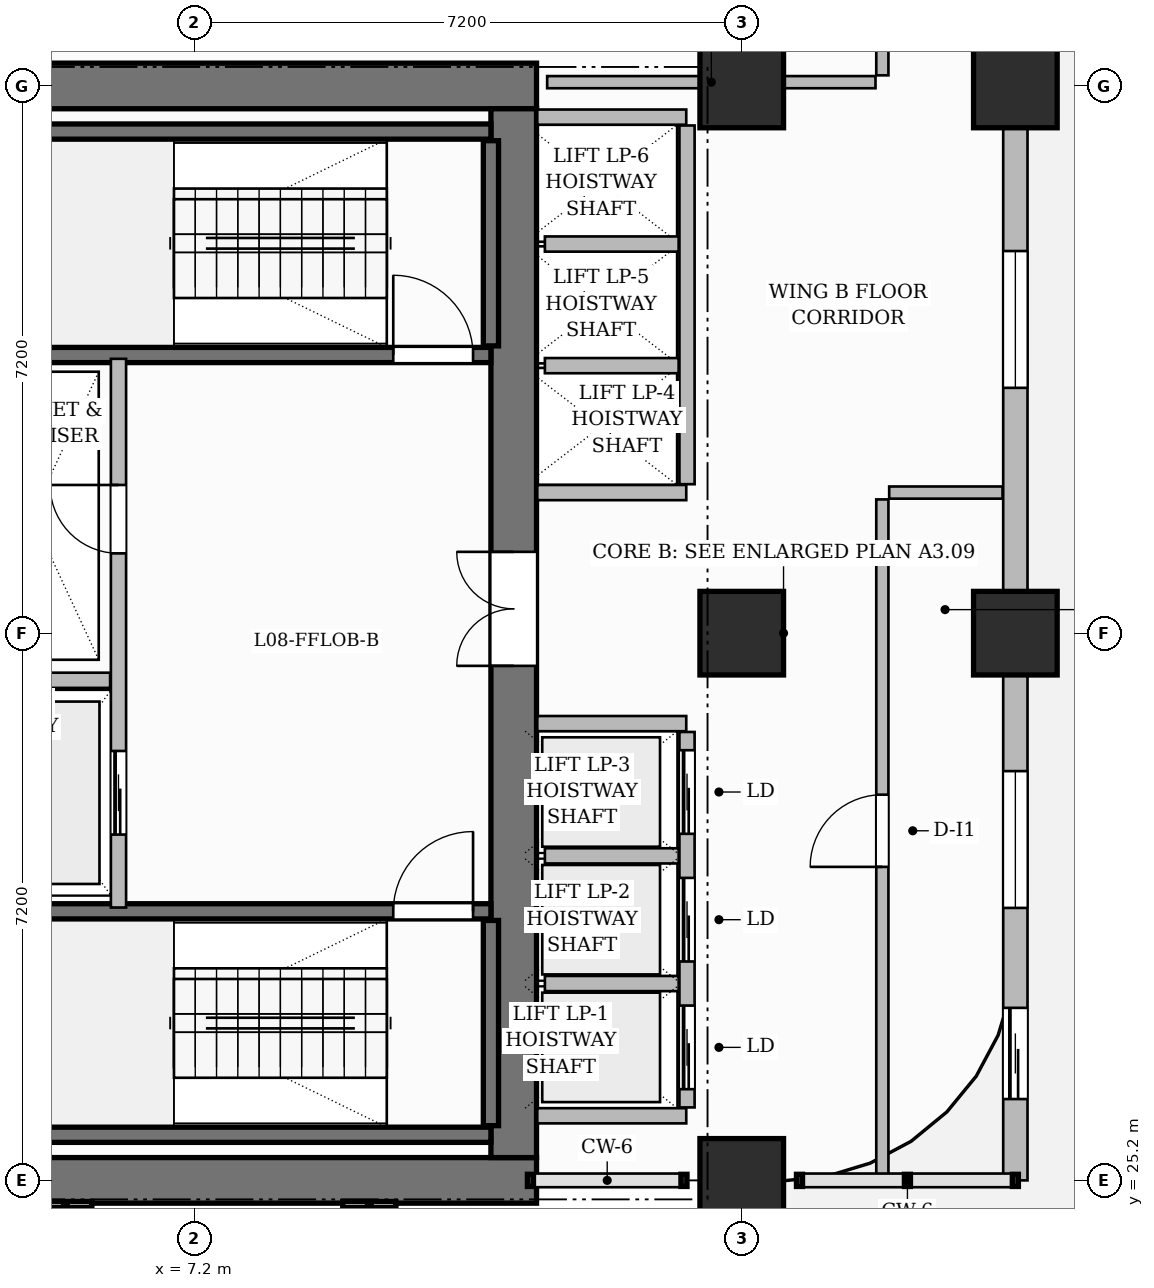
"""IFC4 building model, lengths in metres.
Left out: names, types, materials, properties, quantities, classifications, styles, units other than length and angle.
Written with IfcOpenShell. Run it as: python <this file> out.ifc"""

import sys

from ifc_helpers import new_model, si_unit, direction, frame, frame_2d, origin, origin_2d, place, context, subcontext, project, spatial, rectangle, extrude, source, transform, mapped, element, fill, save


model = new_model("IFC4")
c1 = context("Model", 3, precision=1e-05, world=origin(), true_north=direction((0.0, 1.0)))
c2 = subcontext(c1, "Body", "Model", "MODEL_VIEW")
j1 = project(units=[si_unit("LENGTHUNIT", "METRE"), si_unit("PLANEANGLEUNIT", "RADIAN")], contexts=[c1])
p1 = place(None, origin())
s1 = spatial("IfcSite", under=j1, at=p1, CompositionType="ELEMENT")
p2 = place(p1, origin())
s2 = spatial("IfcBuilding", under=s1, at=p2, CompositionType="ELEMENT")
p3 = place(p2, frame((0.0, 0.0, 39.8)))
s3 = spatial("IfcBuildingStorey", under=s2, at=p3, CompositionType="ELEMENT", Elevation=39.8)
for number, where, z_axis, x_axis in (
    (1, (3.3, 25.2, 0.0), (0.0, 0.0, 1.0), (1.0, 0.0, 0.0)),
    (2, (3.3, 39.6, 0.0), (0.0, 0.0, 1.0), (1.0, 0.0, 0.0)),
):
    element("IfcWall", number, at=place(p3, frame(where, z_axis=z_axis, x_axis=x_axis)), inside=s3, PredefinedType="SHEAR", context=c2, shape_type="SweptSolid", body=[
        extrude(rectangle(XDim=8.4, YDim=0.6, at=frame_2d((4.2, 0.0))), origin(), (0.0, 0.0, 1.0), 3.7),
    ])
p4 = place(p3, frame((11.4, 25.5, 0.0), z_axis=(0.0, 0.0, 1.0), x_axis=(0.0, 1.0, 0.0)))
e3 = element("IfcWall", 3, at=p4, inside=s3, PredefinedType="SHEAR", context=c2, shape_type="SweptSolid", body=[
    extrude(rectangle(XDim=13.8, YDim=0.6, at=frame_2d((6.9, 0.0))), origin(), (0.0, 0.0, 1.0), 3.7),
])
p5 = place(p4, frame((6.47, 0.0, 0.0)))
e4 = element("IfcOpeningElement", 4, at=p5, cuts=e3, PredefinedType="OPENING", context=c2, shape_type="SweptSolid", body=[
    extrude(rectangle(XDim=1.5, YDim=2.2, at=frame_2d((0.75, 1.1))), frame((0.0, 0.31, 0.0), z_axis=(0.0, -1.0, 0.0), x_axis=(1.0, 0.0, 0.0)), (0.0, 0.0, 1.0), 0.62),
])
m1 = source(origin(), c2, "Body", "SweptSolid", [
    extrude(rectangle(XDim=1.1, YDim=1.1, at=origin_2d()), origin(), (0.0, 0.0, 1.0), 3.7),
])
for number, where, z_axis, x_axis in (
    (5, (14.4, 25.2, 0.0), (0.0, 0.0, 1.0), (1.0, 0.0, 0.0)),
    (6, (14.4, 32.4, 0.0), (0.0, 0.0, 1.0), (1.0, 0.0, 0.0)),
    (7, (14.4, 39.6, 0.0), (0.0, 0.0, 1.0), (1.0, 0.0, 0.0)),
    (8, (18.0, 32.4, 0.0), (0.0, 0.0, 1.0), (1.0, 0.0, 0.0)),
    (9, (18.0, 39.6, 0.0), (0.0, 0.0, 1.0), (1.0, 0.0, 0.0)),
):
    element("IfcColumn", number, at=place(p3, frame(where, z_axis=z_axis, x_axis=x_axis)), inside=s3, PredefinedType="COLUMN", context=c2, shape_type="MappedRepresentation", body=[
        mapped(m1, transform((0.0, 0.0, 0.0), scale=1.0)),
    ])
p6 = place(p3, frame((4.0, 25.8, 0.0), z_axis=(0.0, 0.0, 1.0), x_axis=(1.0, 0.0, 0.0)))
e10 = element("IfcWall", 10, at=p6, inside=s3, PredefinedType="SHEAR", context=c2, shape_type="SweptSolid", body=[
    extrude(rectangle(XDim=7.1, YDim=0.2, at=frame_2d((3.55, 0.0))), origin(), (0.0, 0.0, 1.0), 3.7),
])
p7 = place(p3, frame((11.1, 25.92, 0.0), z_axis=(0.0, 0.0, 1.0), x_axis=(0.0, 1.0, 0.0)))
e11 = element("IfcWall", 11, at=p7, inside=s3, PredefinedType="SHEAR", context=c2, shape_type="SweptSolid", body=[
    extrude(rectangle(XDim=2.7, YDim=0.2, at=frame_2d((1.35, 0.0))), origin(), (0.0, 0.0, 1.0), 3.7),
])
p8 = place(p3, frame((4.0, 28.74, 0.0), z_axis=(0.0, 0.0, 1.0), x_axis=(1.0, 0.0, 0.0)))
e12 = element("IfcWall", 12, at=p8, inside=s3, PredefinedType="SHEAR", context=c2, shape_type="SweptSolid", body=[
    extrude(rectangle(XDim=7.1, YDim=0.2, at=frame_2d((3.55, 0.0))), origin(), (0.0, 0.0, 1.0), 3.7),
])
p9 = place(p8, frame((5.815, 0.0, 0.0)))
e13 = element("IfcOpeningElement", 13, at=p9, cuts=e12, PredefinedType="OPENING", context=c2, shape_type="SweptSolid", body=[
    extrude(rectangle(XDim=1.05, YDim=2.2, at=frame_2d((0.525, 1.1))), frame((0.0, 0.11, 0.0), z_axis=(0.0, -1.0, 0.0), x_axis=(1.0, 0.0, 0.0)), (0.0, 0.0, 1.0), 0.22),
])
p10 = place(p3, frame((4.0, 39.0, 0.0), z_axis=(0.0, 0.0, 1.0), x_axis=(1.0, 0.0, 0.0)))
e14 = element("IfcWall", 14, at=p10, inside=s3, PredefinedType="SHEAR", context=c2, shape_type="SweptSolid", body=[
    extrude(rectangle(XDim=7.1, YDim=0.2, at=frame_2d((3.55, 0.0))), origin(), (0.0, 0.0, 1.0), 3.7),
])
p11 = place(p3, frame((11.1, 36.18, 0.0), z_axis=(0.0, 0.0, 1.0), x_axis=(0.0, 1.0, 0.0)))
e15 = element("IfcWall", 15, at=p11, inside=s3, PredefinedType="SHEAR", context=c2, shape_type="SweptSolid", body=[
    extrude(rectangle(XDim=2.7, YDim=0.2, at=frame_2d((1.35, 0.0))), origin(), (0.0, 0.0, 1.0), 3.7),
])
p12 = place(p3, frame((4.0, 36.06, 0.0), z_axis=(0.0, 0.0, 1.0), x_axis=(1.0, 0.0, 0.0)))
e16 = element("IfcWall", 16, at=p12, inside=s3, PredefinedType="SHEAR", context=c2, shape_type="SweptSolid", body=[
    extrude(rectangle(XDim=7.1, YDim=0.2, at=frame_2d((3.55, 0.0))), origin(), (0.0, 0.0, 1.0), 3.7),
])
p13 = place(p12, frame((5.815, 0.0, 0.0)))
e17 = element("IfcOpeningElement", 17, at=p13, cuts=e16, PredefinedType="OPENING", context=c2, shape_type="SweptSolid", body=[
    extrude(rectangle(XDim=1.05, YDim=2.2, at=frame_2d((0.525, 1.1))), frame((0.0, 0.11, 0.0), z_axis=(0.0, -1.0, 0.0), x_axis=(1.0, 0.0, 0.0)), (0.0, 0.0, 1.0), 0.22),
])
p14 = place(p3, frame((6.2, 28.79, 0.0), z_axis=(0.0, 0.0, 1.0), x_axis=(0.0, 1.0, 0.0)))
e18 = element("IfcWall", 18, at=p14, inside=s3, PredefinedType="PARTITIONING", context=c2, shape_type="SweptSolid", body=[
    extrude(rectangle(XDim=7.22, YDim=0.2, at=frame_2d((3.61, 0.0))), origin(), (0.0, 0.0, 1.0), 3.45),
])
p15 = place(p14, frame((4.66, 0.0, 0.0)))
e19 = element("IfcOpeningElement", 19, at=p15, cuts=e18, PredefinedType="OPENING", context=c2, shape_type="SweptSolid", body=[
    extrude(rectangle(XDim=0.9, YDim=2.1, at=frame_2d((0.45, 1.05))), frame((0.0, 0.11, 0.0), z_axis=(0.0, -1.0, 0.0), x_axis=(1.0, 0.0, 0.0)), (0.0, 0.0, 1.0), 0.22),
])
p16 = place(p14, frame((0.96, 0.0, 0.0)))
e20 = element("IfcOpeningElement", 20, at=p16, cuts=e18, PredefinedType="OPENING", context=c2, shape_type="SweptSolid", body=[
    extrude(rectangle(XDim=1.1, YDim=2.2, at=frame_2d((0.55, 1.1))), frame((0.0, 0.11, 0.0), z_axis=(0.0, -1.0, 0.0), x_axis=(1.0, 0.0, 0.0)), (0.0, 0.0, 1.0), 0.22),
])
p17 = place(p3, frame((3.96, 31.78, 0.0), z_axis=(0.0, 0.0, 1.0), x_axis=(1.0, 0.0, 0.0)))
e21 = element("IfcWall", 21, at=p17, inside=s3, PredefinedType="PARTITIONING", context=c2, shape_type="SweptSolid", body=[
    extrude(rectangle(XDim=2.13, YDim=0.2, at=frame_2d((1.065, 0.0))), origin(), (0.0, 0.0, 1.0), 3.45),
])
for number, where, z_axis, x_axis in (
    (22, (11.71, 26.05, 0.0), (0.0, 0.0, 1.0), (1.0, 0.0, 0.0)),
    (23, (11.71, 31.21, 0.0), (0.0, 0.0, 1.0), (1.0, 0.0, 0.0)),
):
    element("IfcWall", number, at=place(p3, frame(where, z_axis=z_axis, x_axis=x_axis)), inside=s3, PredefinedType="PARTITIONING", context=c2, shape_type="SweptSolid", body=[
        extrude(rectangle(XDim=1.96, YDim=0.2, at=frame_2d((0.98, 0.0))), origin(), (0.0, 0.0, 1.0), 3.45),
    ])
p18 = place(p3, frame((13.68, 26.16, 0.0), z_axis=(0.0, 0.0, 1.0), x_axis=(0.0, 1.0, 0.0)))
e24 = element("IfcWall", 24, at=p18, inside=s3, PredefinedType="PARTITIONING", context=c2, shape_type="SweptSolid", body=[
    extrude(rectangle(XDim=4.94, YDim=0.2, at=frame_2d((2.47, 0.0))), origin(), (0.0, 0.0, 1.0), 3.45),
])
p19 = place(p18, frame((0.24, 0.0, 0.0)))
e25 = element("IfcOpeningElement", 25, at=p19, cuts=e24, PredefinedType="OPENING", context=c2, shape_type="SweptSolid", body=[
    extrude(rectangle(XDim=1.1, YDim=2.2, at=frame_2d((0.55, 1.1))), frame((0.0, 0.11, 0.0), z_axis=(0.0, -1.0, 0.0), x_axis=(1.0, 0.0, 0.0)), (0.0, 0.0, 1.0), 0.22),
])
p20 = place(p18, frame((1.92, 0.0, 0.0)))
e26 = element("IfcOpeningElement", 26, at=p20, cuts=e24, PredefinedType="OPENING", context=c2, shape_type="SweptSolid", body=[
    extrude(rectangle(XDim=1.1, YDim=2.2, at=frame_2d((0.55, 1.1))), frame((0.0, 0.11, 0.0), z_axis=(0.0, -1.0, 0.0), x_axis=(1.0, 0.0, 0.0)), (0.0, 0.0, 1.0), 0.22),
])
p21 = place(p18, frame((3.6, 0.0, 0.0)))
e27 = element("IfcOpeningElement", 27, at=p21, cuts=e24, PredefinedType="OPENING", context=c2, shape_type="SweptSolid", body=[
    extrude(rectangle(XDim=1.1, YDim=2.2, at=frame_2d((0.55, 1.1))), frame((0.0, 0.11, 0.0), z_axis=(0.0, -1.0, 0.0), x_axis=(1.0, 0.0, 0.0)), (0.0, 0.0, 1.0), 0.22),
])
for number, where, z_axis, x_axis in (
    (28, (11.81, 27.79, 0.0), (0.0, 0.0, 1.0), (1.0, 0.0, 0.0)),
    (29, (11.81, 29.47, 0.0), (0.0, 0.0, 1.0), (1.0, 0.0, 0.0)),
):
    element("IfcWall", number, at=place(p3, frame(where, z_axis=z_axis, x_axis=x_axis)), inside=s3, PredefinedType="PARTITIONING", context=c2, shape_type="SweptSolid", body=[
        extrude(rectangle(XDim=1.76, YDim=0.2, at=frame_2d((0.88, 0.0))), origin(), (0.0, 0.0, 1.0), 3.45),
    ])
for number, where, z_axis, x_axis in (
    (30, (11.71, 34.25, 0.0), (0.0, 0.0, 1.0), (1.0, 0.0, 0.0)),
    (31, (11.71, 39.19, 0.0), (0.0, 0.0, 1.0), (1.0, 0.0, 0.0)),
):
    element("IfcWall", number, at=place(p3, frame(where, z_axis=z_axis, x_axis=x_axis)), inside=s3, PredefinedType="PARTITIONING", context=c2, shape_type="SweptSolid", body=[
        extrude(rectangle(XDim=1.96, YDim=0.2, at=frame_2d((0.98, 0.0))), origin(), (0.0, 0.0, 1.0), 3.45),
    ])
p22 = place(p3, frame((13.68, 34.36, 0.0), z_axis=(0.0, 0.0, 1.0), x_axis=(0.0, 1.0, 0.0)))
e32 = element("IfcWall", 32, at=p22, inside=s3, PredefinedType="PARTITIONING", context=c2, shape_type="SweptSolid", body=[
    extrude(rectangle(XDim=4.72, YDim=0.2, at=frame_2d((2.36, 0.0))), origin(), (0.0, 0.0, 1.0), 3.45),
])
for number, where, z_axis, x_axis in (
    (33, (11.81, 35.92, 0.0), (0.0, 0.0, 1.0), (1.0, 0.0, 0.0)),
    (34, (11.81, 37.52, 0.0), (0.0, 0.0, 1.0), (1.0, 0.0, 0.0)),
):
    element("IfcWall", number, at=place(p3, frame(where, z_axis=z_axis, x_axis=x_axis)), inside=s3, PredefinedType="PARTITIONING", context=c2, shape_type="SweptSolid", body=[
        extrude(rectangle(XDim=1.76, YDim=0.2, at=frame_2d((0.88, 0.0))), origin(), (0.0, 0.0, 1.0), 3.45),
    ])
p23 = place(p3, frame((16.25, 25.228, 0.0), z_axis=(0.0, 0.0, 1.0), x_axis=(0.0, 1.0, 0.0)))
e35 = element("IfcWall", 35, at=p23, inside=s3, PredefinedType="PARTITIONING", context=c2, shape_type="SweptSolid", body=[
    extrude(rectangle(XDim=8.932, YDim=0.16, at=frame_2d((4.466, 0.0))), origin(), (0.0, 0.0, 1.0), 3.45),
])
p24 = place(p23, frame((4.097, 0.0, 0.0)))
e36 = element("IfcOpeningElement", 36, at=p24, cuts=e35, PredefinedType="OPENING", context=c2, shape_type="SweptSolid", body=[
    extrude(rectangle(XDim=0.95, YDim=2.15, at=frame_2d((0.475, 1.075))), frame((0.0, 0.09, 0.0), z_axis=(0.0, -1.0, 0.0), x_axis=(1.0, 0.0, 0.0)), (0.0, 0.0, 1.0), 0.18),
])
p25 = place(p3, frame((16.34, 34.25, 0.0), z_axis=(0.0, 0.0, 1.0), x_axis=(1.0, 0.0, 0.0)))
e37 = element("IfcWall", 37, at=p25, inside=s3, PredefinedType="PARTITIONING", context=c2, shape_type="SweptSolid", body=[
    extrude(rectangle(XDim=1.492, YDim=0.16, at=frame_2d((0.746, 0.0))), origin(), (0.0, 0.0, 1.0), 3.45),
])
p26 = place(p3, frame((16.25, 39.74, 0.0), z_axis=(0.0, 0.0, 1.0), x_axis=(0.0, 1.0, 0.0)))
e38 = element("IfcWall", 38, at=p26, inside=s3, PredefinedType="PARTITIONING", context=c2, shape_type="SweptSolid", body=[
    extrude(rectangle(XDim=6.892, YDim=0.16, at=frame_2d((3.446, 0.0))), origin(), (0.0, 0.0, 1.0), 3.45),
])
p27 = place(p26, frame((0.585, 0.0, 0.0)))
e39 = element("IfcOpeningElement", 39, at=p27, cuts=e38, PredefinedType="OPENING", context=c2, shape_type="SweptSolid", body=[
    extrude(rectangle(XDim=1.4, YDim=2.35, at=frame_2d((0.7, 1.175))), frame((0.0, 0.09, 0.0), z_axis=(0.0, -1.0, 0.0), x_axis=(1.0, 0.0, 0.0)), (0.0, 0.0, 1.0), 0.18),
])
p28 = place(p26, frame((4.285, 0.0, 0.0)))
e40 = element("IfcOpeningElement", 40, at=p28, cuts=e38, PredefinedType="OPENING", context=c2, shape_type="SweptSolid", body=[
    extrude(rectangle(XDim=1.0, YDim=2.2, at=frame_2d((0.5, 1.1))), frame((0.0, 0.09, 0.0), z_axis=(0.0, -1.0, 0.0), x_axis=(1.0, 0.0, 0.0)), (0.0, 0.0, 1.0), 0.18),
])
p29 = place(p3, frame((11.84, 39.65, 0.0), z_axis=(0.0, 0.0, 1.0), x_axis=(1.0, 0.0, 0.0)))
e41 = element("IfcWall", 41, at=p29, inside=s3, PredefinedType="PARTITIONING", context=c2, shape_type="SweptSolid", body=[
    extrude(rectangle(XDim=4.32, YDim=0.16, at=frame_2d((2.16, 0.0))), origin(), (0.0, 0.0, 1.0), 2.885),
])
p30 = place(p3, frame((18.0, 25.2, 0.0), z_axis=(0.0, 0.0, 1.0), x_axis=(0.0, 1.0, 0.0)))
e42 = element("IfcWall", 42, at=p30, inside=s3, PredefinedType="SOLIDWALL", context=c2, shape_type="SweptSolid", body=[
    extrude(rectangle(XDim=21.55, YDim=0.32, at=frame_2d((10.775, 0.0))), origin(), (0.0, 0.0, 1.0), 3.45),
])
p31 = place(p30, frame((18.5, 0.0, 0.0)))
e43 = element("IfcOpeningElement", 43, at=p31, cuts=e42, PredefinedType="OPENING", context=c2, shape_type="SweptSolid", body=[
    extrude(rectangle(XDim=1.2, YDim=2.2, at=frame_2d((0.6, 1.1))), frame((0.0, 0.17, 0.0), z_axis=(0.0, -1.0, 0.0), x_axis=(1.0, 0.0, 0.0)), (0.0, 0.0, 1.0), 0.34),
])
p32 = place(p30, frame((1.07, 0.0, 0.0)))
e44 = element("IfcOpeningElement", 44, at=p32, cuts=e42, PredefinedType="OPENING", context=c2, shape_type="SweptSolid", body=[
    extrude(rectangle(XDim=1.2, YDim=2.2, at=frame_2d((0.6, 1.1))), frame((0.0, 0.17, 0.0), z_axis=(0.0, -1.0, 0.0), x_axis=(1.0, 0.0, 0.0)), (0.0, 0.0, 1.0), 0.34),
])
p33 = place(p30, frame((3.585, 0.0, 0.8)))
e45 = element("IfcOpeningElement", 45, at=p33, cuts=e42, PredefinedType="OPENING", context=c2, shape_type="SweptSolid", body=[
    extrude(rectangle(XDim=1.8, YDim=1.85, at=frame_2d((0.9, 0.925))), frame((0.0, 0.17, 0.0), z_axis=(0.0, -1.0, 0.0), x_axis=(1.0, 0.0, 0.0)), (0.0, 0.0, 1.0), 0.34),
])
p34 = place(p30, frame((10.428, 0.0, 0.8)))
e46 = element("IfcOpeningElement", 46, at=p34, cuts=e42, PredefinedType="OPENING", context=c2, shape_type="SweptSolid", body=[
    extrude(rectangle(XDim=1.8, YDim=1.85, at=frame_2d((0.9, 0.925))), frame((0.0, 0.17, 0.0), z_axis=(0.0, -1.0, 0.0), x_axis=(1.0, 0.0, 0.0)), (0.0, 0.0, 1.0), 0.34),
])
p35 = place(p30, frame((15.8, 0.0, 0.8)))
e47 = element("IfcOpeningElement", 47, at=p35, cuts=e42, PredefinedType="OPENING", context=c2, shape_type="SweptSolid", body=[
    extrude(rectangle(XDim=1.8, YDim=1.85, at=frame_2d((0.9, 0.925))), frame((0.0, 0.17, 0.0), z_axis=(0.0, -1.0, 0.0), x_axis=(1.0, 0.0, 0.0)), (0.0, 0.0, 1.0), 0.34),
])
m2 = source(origin(), c2, "Body", "SweptSolid", [
    extrude(rectangle(XDim=1.05, YDim=2.2, at=frame_2d((0.525, 1.1))), frame((0.0, 0.025, 0.0), z_axis=(0.0, -1.0, 0.0), x_axis=(1.0, 0.0, 0.0)), (0.0, 0.0, 1.0), 0.05),
])
p36 = place(p9, origin())
e48 = element("IfcDoor", 48, at=p36, inside=s3, OperationType="SINGLE_SWING_RIGHT", PredefinedType="DOOR", context=c2, shape_type="MappedRepresentation", body=[
    mapped(m2, transform((0.0, 0.0, 0.0), scale=1.0)),
])
fill(e13, e48)
p37 = place(p13, origin())
e49 = element("IfcDoor", 49, at=p37, inside=s3, OperationType="SINGLE_SWING_LEFT", PredefinedType="DOOR", context=c2, shape_type="MappedRepresentation", body=[
    mapped(m2, transform((0.0, 0.0, 0.0), scale=1.0)),
])
fill(e17, e49)
m3 = source(origin(), c2, "Body", "SweptSolid", [
    extrude(rectangle(XDim=0.9, YDim=2.1, at=frame_2d((0.45, 1.05))), frame((0.0, 0.025, 0.0), z_axis=(0.0, -1.0, 0.0), x_axis=(1.0, 0.0, 0.0)), (0.0, 0.0, 1.0), 0.05),
])
p38 = place(p15, origin())
e50 = element("IfcDoor", 50, at=p38, inside=s3, OperationType="SINGLE_SWING_RIGHT", PredefinedType="DOOR", context=c2, shape_type="MappedRepresentation", body=[
    mapped(m3, transform((0.0, 0.0, 0.0), scale=1.0)),
])
fill(e19, e50)
m4 = source(origin(), c2, "Body", "SweptSolid", [
    extrude(rectangle(XDim=1.5, YDim=2.2, at=frame_2d((0.75, 1.1))), frame((0.0, 0.025, 0.0), z_axis=(0.0, -1.0, 0.0), x_axis=(1.0, 0.0, 0.0)), (0.0, 0.0, 1.0), 0.05),
])
p39 = place(p5, origin())
e51 = element("IfcDoor", 51, at=p39, inside=s3, OperationType="DOUBLE_DOOR_SINGLE_SWING", PredefinedType="DOOR", context=c2, shape_type="MappedRepresentation", body=[
    mapped(m4, transform((0.0, 0.0, 0.0), scale=1.0)),
])
fill(e4, e51)
m5 = source(origin(), c2, "Body", "SweptSolid", [
    extrude(rectangle(XDim=0.95, YDim=2.15, at=frame_2d((0.475, 1.075))), frame((0.0, 0.025, 0.0), z_axis=(0.0, -1.0, 0.0), x_axis=(1.0, 0.0, 0.0)), (0.0, 0.0, 1.0), 0.05),
])
p40 = place(p24, origin())
e52 = element("IfcDoor", 52, at=p40, inside=s3, OperationType="SINGLE_SWING_LEFT", PredefinedType="DOOR", context=c2, shape_type="MappedRepresentation", body=[
    mapped(m5, transform((0.0, 0.0, 0.0), scale=1.0)),
])
fill(e36, e52)
m6 = source(origin(), c2, "Body", "SweptSolid", [
    extrude(rectangle(XDim=1.1, YDim=2.2, at=frame_2d((0.55, 1.1))), frame((0.0, 0.025, 0.0), z_axis=(0.0, -1.0, 0.0), x_axis=(1.0, 0.0, 0.0)), (0.0, 0.0, 1.0), 0.05),
])
p41 = place(p16, origin())
e53 = element("IfcDoor", 53, at=p41, inside=s3, OperationType="SLIDING_TO_LEFT", PredefinedType="DOOR", context=c2, shape_type="MappedRepresentation", body=[
    mapped(m6, transform((0.0, 0.0, 0.0), scale=1.0)),
])
fill(e20, e53)
p42 = place(p19, origin())
e54 = element("IfcDoor", 54, at=p42, inside=s3, OperationType="SLIDING_TO_LEFT", PredefinedType="DOOR", context=c2, shape_type="MappedRepresentation", body=[
    mapped(m6, transform((0.0, 0.0, 0.0), scale=1.0)),
])
fill(e25, e54)
p43 = place(p20, origin())
e55 = element("IfcDoor", 55, at=p43, inside=s3, OperationType="SLIDING_TO_LEFT", PredefinedType="DOOR", context=c2, shape_type="MappedRepresentation", body=[
    mapped(m6, transform((0.0, 0.0, 0.0), scale=1.0)),
])
fill(e26, e55)
p44 = place(p21, origin())
e56 = element("IfcDoor", 56, at=p44, inside=s3, OperationType="SLIDING_TO_LEFT", PredefinedType="DOOR", context=c2, shape_type="MappedRepresentation", body=[
    mapped(m6, transform((0.0, 0.0, 0.0), scale=1.0)),
])
fill(e27, e56)
m7 = source(origin(), c2, "Body", "SweptSolid", [
    extrude(rectangle(XDim=1.2, YDim=2.2, at=frame_2d((0.6, 1.1))), frame((0.0, 0.025, 0.0), z_axis=(0.0, -1.0, 0.0), x_axis=(1.0, 0.0, 0.0)), (0.0, 0.0, 1.0), 0.05),
])
p45 = place(p32, origin())
e57 = element("IfcDoor", 57, at=p45, inside=s3, OperationType="SLIDING_TO_LEFT", PredefinedType="DOOR", context=c2, shape_type="MappedRepresentation", body=[
    mapped(m7, transform((0.0, 0.0, 0.0), scale=1.0)),
])
fill(e44, e57)
m8 = source(origin(), c2, "Body", "SweptSolid", [
    extrude(rectangle(XDim=1.8, YDim=1.85, at=frame_2d((0.9, 0.925))), frame((0.0, 0.03, 0.0), z_axis=(0.0, -1.0, 0.0), x_axis=(1.0, 0.0, 0.0)), (0.0, 0.0, 1.0), 0.06),
])
p46 = place(p33, origin())
e58 = element("IfcWindow", 58, at=p46, inside=s3, PartitioningType="DOUBLE_PANEL_VERTICAL", PredefinedType="WINDOW", context=c2, shape_type="MappedRepresentation", body=[
    mapped(m8, transform((0.0, 0.0, 0.0), scale=1.0)),
])
fill(e45, e58)
p47 = place(p34, origin())
e59 = element("IfcWindow", 59, at=p47, inside=s3, PartitioningType="DOUBLE_PANEL_VERTICAL", PredefinedType="WINDOW", context=c2, shape_type="MappedRepresentation", body=[
    mapped(m8, transform((0.0, 0.0, 0.0), scale=1.0)),
])
fill(e46, e59)
save(model, sys.argv[1])
